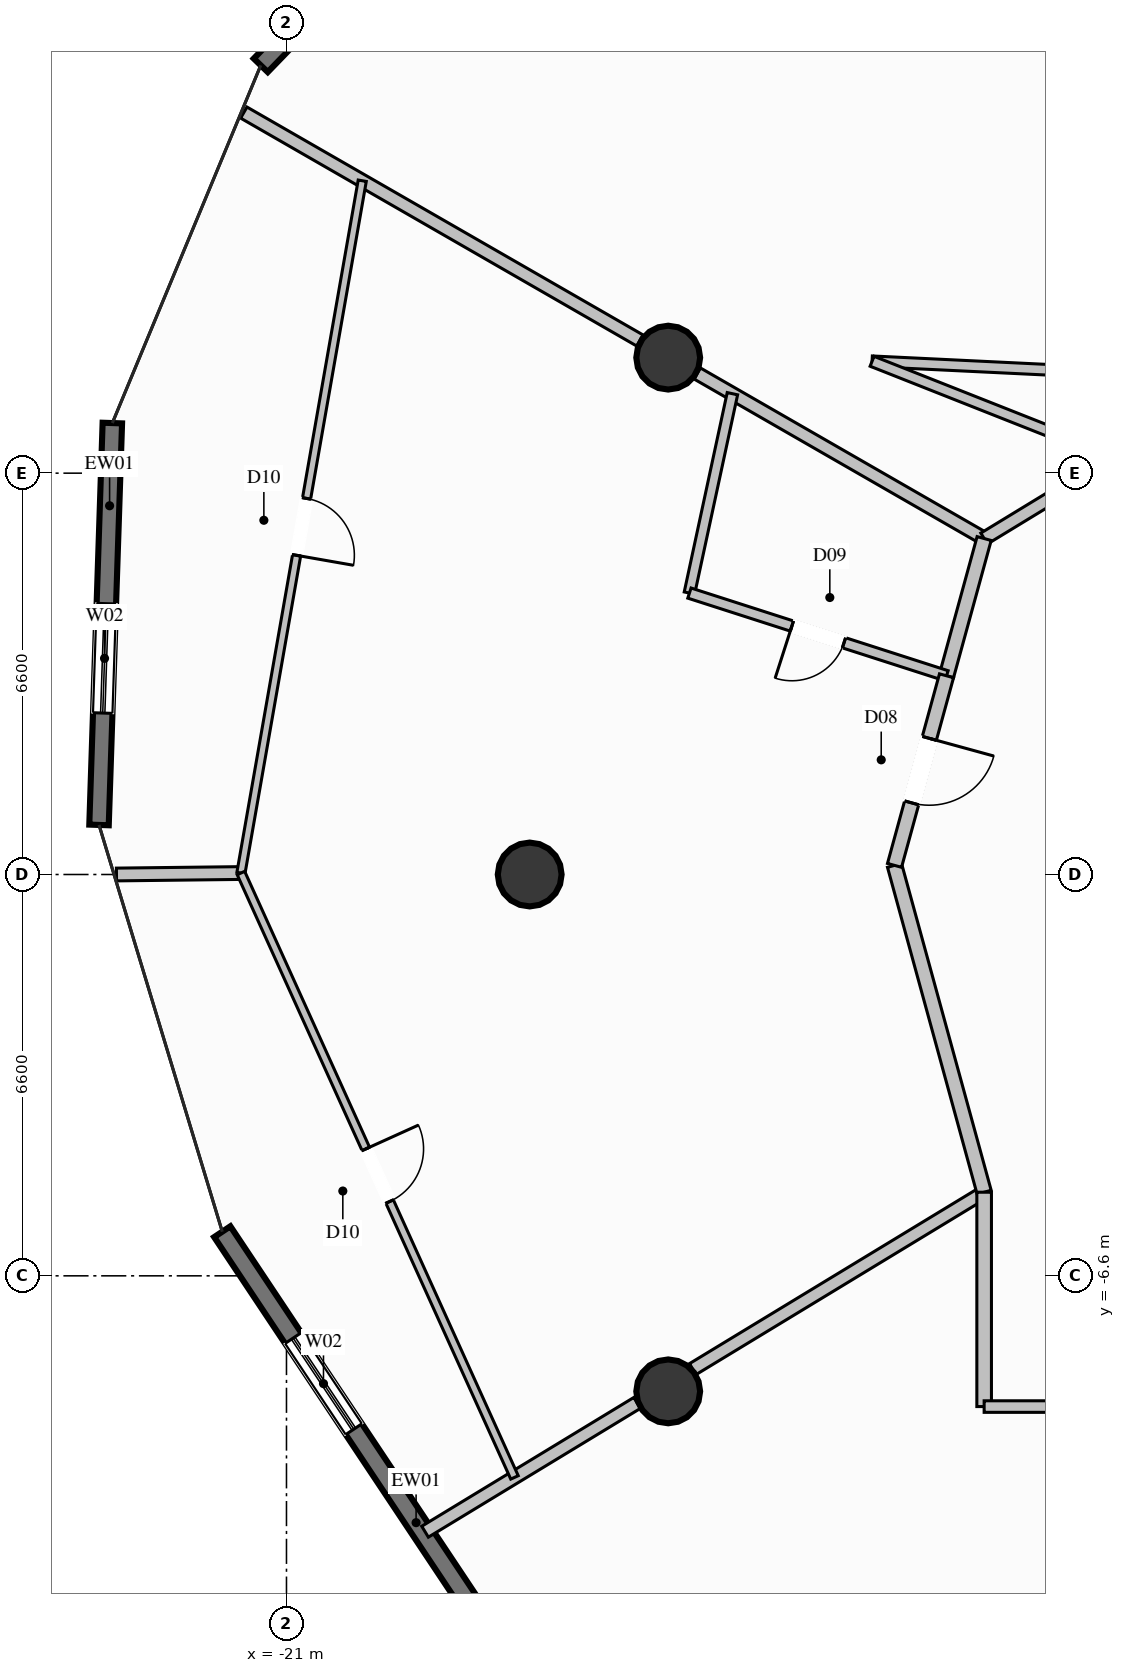
"""IFC4 building model, lengths in metres.
Left out: names, types, materials, properties, quantities, classifications, styles, units other than length and angle.
Written with IfcOpenShell. Run it as: python <this file> out.ifc"""

import sys

from ifc_helpers import new_model, si_unit, direction, frame, frame_2d, origin, origin_2d, place, context, subcontext, project, spatial, rectangle, circle, extrude, element, fill, save


model = new_model("IFC4")
c1 = context("Model", 3, precision=1e-05, world=origin(), true_north=direction((0.0, 1.0)))
c2 = subcontext(c1, "Body", "Model", "MODEL_VIEW")
j1 = project(units=[si_unit("LENGTHUNIT", "METRE"), si_unit("PLANEANGLEUNIT", "RADIAN")], contexts=[c1])
p1 = place(None, origin())
s1 = spatial("IfcSite", under=j1, at=p1, CompositionType="ELEMENT")
p2 = place(p1, origin())
s2 = spatial("IfcBuilding", under=s1, at=p2, CompositionType="ELEMENT")
p3 = place(p2, frame((0.0, 0.0, 113.4)))
s3 = spatial("IfcBuildingStorey", under=s2, at=p3, CompositionType="ELEMENT", Elevation=113.4)
for number, where, z_axis, x_axis in (
    (1, (-14.722, 8.5, 0.0), (0.0, 0.0, 1.0), (1.0, 0.0, 0.0)),
    (2, (-17.0, 0.0, 0.0), (0.0, 0.0, 1.0), (1.0, 0.0, 0.0)),
    (3, (-14.722, -8.5, 0.0), (0.0, 0.0, 1.0), (1.0, 0.0, 0.0)),
):
    element("IfcColumn", number, at=place(p3, frame(where, z_axis=z_axis, x_axis=x_axis)), inside=s3, PredefinedType="COLUMN", context=c2, shape_type="SweptSolid", body=[
        extrude(circle(Radius=0.525, at=origin_2d()), origin(), (0.0, 0.0, 1.0), 3.6),
    ])
p4 = place(p3, frame((-21.423, 13.307, 0.0), z_axis=(0.0, 0.0, 1.0), x_axis=(0.694909802273, 0.71909691051, 0.0)))
e4 = element("IfcWall", 4, at=p4, inside=s3, PredefinedType="SOLIDWALL", context=c2, shape_type="SweptSolid", body=[
    extrude(rectangle(XDim=6.369, YDim=0.32, at=frame_2d((3.185, 0.0))), origin(), (0.0, 0.0, 1.0), 3.35),
])
p5 = place(p4, frame((2.285, 0.0, 0.35)))
e5 = element("IfcOpeningElement", 5, at=p5, cuts=e4, PredefinedType="OPENING", context=c2, shape_type="SweptSolid", body=[
    extrude(rectangle(XDim=1.8, YDim=2.6, at=frame_2d((0.9, 1.3))), frame((0.0, 0.17, 0.0), z_axis=(0.0, -1.0, 0.0), x_axis=(1.0, 0.0, 0.0)), (0.0, 0.0, 1.0), 0.34),
])
p6 = place(p3, frame((-24.083, 0.815, 0.0), z_axis=(0.0, 0.0, 1.0), x_axis=(0.033116914102, 0.999451484566, 0.0)))
e6 = element("IfcWall", 6, at=p6, inside=s3, PredefinedType="SOLIDWALL", context=c2, shape_type="SweptSolid", body=[
    extrude(rectangle(XDim=6.613, YDim=0.32, at=frame_2d((3.306, 0.0))), origin(), (0.0, 0.0, 1.0), 3.35),
])
p7 = place(p6, frame((1.841, 0.0, 0.35)))
e7 = element("IfcOpeningElement", 7, at=p7, cuts=e6, PredefinedType="OPENING", context=c2, shape_type="SweptSolid", body=[
    extrude(rectangle(XDim=1.8, YDim=2.6, at=frame_2d((0.9, 1.3))), frame((0.0, 0.17, 0.0), z_axis=(0.0, -1.0, 0.0), x_axis=(1.0, 0.0, 0.0)), (0.0, 0.0, 1.0), 0.34),
])
p8 = place(p3, frame((-17.983, -11.988, 0.0), z_axis=(0.0, 0.0, 1.0), x_axis=(-0.554416410256, 0.832239415096, 0.0)))
e8 = element("IfcWall", 8, at=p8, inside=s3, PredefinedType="SOLIDWALL", context=c2, shape_type="SweptSolid", body=[
    extrude(rectangle(XDim=7.346, YDim=0.32, at=frame_2d((3.673, 0.0))), origin(), (0.0, 0.0, 1.0), 3.35),
])
p9 = place(p8, frame((3.444, 0.0, 0.35)))
e9 = element("IfcOpeningElement", 9, at=p9, cuts=e8, PredefinedType="OPENING", context=c2, shape_type="SweptSolid", body=[
    extrude(rectangle(XDim=1.8, YDim=2.6, at=frame_2d((0.9, 1.3))), frame((0.0, 0.17, 0.0), z_axis=(0.0, -1.0, 0.0), x_axis=(1.0, 0.0, 0.0)), (0.0, 0.0, 1.0), 0.34),
])
p10 = place(p3, frame((-9.526, 5.525, 0.0), z_axis=(0.0, 0.0, 1.0), x_axis=(-0.866806949329, 0.498643873516, 0.0)))
e10 = element("IfcWall", 10, at=p10, inside=s3, PredefinedType="PARTITIONING", context=c2, shape_type="SweptSolid", body=[
    extrude(rectangle(XDim=5.443, YDim=0.21, at=frame_2d((2.721, 0.0))), origin(), (0.0, 0.0, 1.0), 2.718),
])
p11 = place(p3, frame((-15.188, 8.782, 0.0), z_axis=(0.0, 0.0, 1.0), x_axis=(-0.866759918317, 0.498725619954, 0.0)))
e11 = element("IfcWall", 11, at=p11, inside=s3, PredefinedType="PARTITIONING", context=c2, shape_type="SweptSolid", body=[
    extrude(rectangle(XDim=7.515, YDim=0.21, at=frame_2d((3.758, 0.0))), origin(), (0.0, 0.0, 1.0), 3.35),
])
p12 = place(p3, frame((-9.526, -5.225, 0.0), z_axis=(0.0, 0.0, 1.0), x_axis=(-0.854837879537, -0.518895172178, 0.0)))
e12 = element("IfcWall", 12, at=p12, inside=s3, PredefinedType="PARTITIONING", context=c2, shape_type="SweptSolid", body=[
    extrude(rectangle(XDim=5.606, YDim=0.21, at=frame_2d((2.803, 0.0))), origin(), (0.0, 0.0, 1.0), 2.718),
])
p13 = place(p3, frame((-15.233, -8.69, 0.0), z_axis=(0.0, 0.0, 1.0), x_axis=(-0.854741066816, -0.519054629782, 0.0)))
e13 = element("IfcWall", 13, at=p13, inside=s3, PredefinedType="PARTITIONING", context=c2, shape_type="SweptSolid", body=[
    extrude(rectangle(XDim=4.081, YDim=0.21, at=frame_2d((2.041, 0.0))), origin(), (0.0, 0.0, 1.0), 3.35),
])
p14 = place(p3, frame((-11.369, 8.44, 0.0), z_axis=(0.0, 0.0, 1.0), x_axis=(0.998833567436, -0.048285655878, 0.0)))
e14 = element("IfcWall", 14, at=p14, inside=s3, PredefinedType="PLUMBINGWALL", context=c2, shape_type="SweptSolid", body=[
    extrude(rectangle(XDim=5.425, YDim=0.175, at=frame_2d((2.713, 0.0))), origin(), (0.0, 0.0, 1.0), 3.35),
])
p15 = place(p3, frame((-11.369, 8.44, 0.0), z_axis=(0.0, 0.0, 1.0), x_axis=(0.929880296265, -0.367862249516, 0.0)))
e15 = element("IfcWall", 15, at=p15, inside=s3, PredefinedType="PLUMBINGWALL", context=c2, shape_type="SweptSolid", body=[
    extrude(rectangle(XDim=4.322, YDim=0.175, at=frame_2d((2.161, 0.0))), origin(), (0.0, 0.0, 1.0), 2.718),
])
p16 = place(p3, frame((-9.526, 5.525, 0.0), z_axis=(0.0, 0.0, 1.0), x_axis=(0.854057882133, 0.520177982969, 0.0)))
e16 = element("IfcWall", 16, at=p16, inside=s3, PredefinedType="PARTITIONING", context=c2, shape_type="SweptSolid", body=[
    extrude(rectangle(XDim=2.548, YDim=0.21, at=frame_2d((1.274, 0.0))), origin(), (0.0, 0.0, 1.0), 3.35),
])
p17 = place(p3, frame((-9.526, 5.525, 0.0), z_axis=(0.0, 0.0, 1.0), x_axis=(-0.264564800962, -0.964367910132, 0.0)))
e17 = element("IfcWall", 17, at=p17, inside=s3, PredefinedType="PARTITIONING", context=c2, shape_type="SweptSolid", body=[
    extrude(rectangle(XDim=2.34, YDim=0.24, at=frame_2d((1.17, 0.0))), origin(), (0.0, 0.0, 1.0), 3.35),
])
p18 = place(p3, frame((-13.666, 7.907, 0.0), z_axis=(0.0, 0.0, 1.0), x_axis=(-0.210776507194, -0.977534277668, 0.0)))
e18 = element("IfcWall", 18, at=p18, inside=s3, PredefinedType="PLUMBINGWALL", context=c2, shape_type="SweptSolid", body=[
    extrude(rectangle(XDim=3.354, YDim=0.175, at=frame_2d((1.677, 0.0))), origin(), (0.0, 0.0, 1.0), 3.35),
])
p19 = place(p3, frame((-10.145, 3.268, 0.0), z_axis=(0.0, 0.0, 1.0), x_axis=(-0.95197249486, 0.306183554473, 0.0)))
e19 = element("IfcWall", 19, at=p19, inside=s3, PredefinedType="PLUMBINGWALL", context=c2, shape_type="SweptSolid", body=[
    extrude(rectangle(XDim=4.441, YDim=0.175, at=frame_2d((2.221, 0.0))), origin(), (0.0, 0.0, 1.0), 3.35),
])
p20 = place(p19, frame((1.771, 0.0, 0.0)))
e20 = element("IfcOpeningElement", 20, at=p20, cuts=e19, PredefinedType="OPENING", context=c2, shape_type="SweptSolid", body=[
    extrude(rectangle(XDim=0.9, YDim=2.1, at=frame_2d((0.45, 1.05))), frame((0.0, 0.098, 0.0), z_axis=(0.0, -1.0, 0.0), x_axis=(1.0, 0.0, 0.0)), (0.0, 0.0, 1.0), 0.195),
])
p21 = place(p3, frame((-21.749, 0.024, 0.0), z_axis=(0.0, 0.0, 1.0), x_axis=(-0.999931691442, -0.011688132844, 0.0)))
e21 = element("IfcWall", 21, at=p21, inside=s3, PredefinedType="PARTITIONING", context=c2, shape_type="SweptSolid", body=[
    extrude(rectangle(XDim=2.047, YDim=0.21, at=frame_2d((1.023, 0.0))), origin(), (0.0, 0.0, 1.0), 3.35),
])
p22 = place(p3, frame((-11.0, 0.15, 0.0), z_axis=(0.0, 0.0, 1.0), x_axis=(0.264488542062, -0.964388827765, 0.0)))
e22 = element("IfcWall", 22, at=p22, inside=s3, PredefinedType="PARTITIONING", context=c2, shape_type="SweptSolid", body=[
    extrude(rectangle(XDim=5.573, YDim=0.24, at=frame_2d((2.787, 0.0))), origin(), (0.0, 0.0, 1.0), 3.35),
])
p23 = place(p3, frame((-10.145, 3.268, 0.0), z_axis=(0.0, 0.0, 1.0), x_axis=(-0.264433345006, -0.96440396414, 0.0)))
e23 = element("IfcWall", 23, at=p23, inside=s3, PredefinedType="PARTITIONING", context=c2, shape_type="SweptSolid", body=[
    extrude(rectangle(XDim=3.233, YDim=0.24, at=frame_2d((1.617, 0.0))), origin(), (0.0, 0.0, 1.0), 3.35),
])
p24 = place(p23, frame((1.067, 0.0, 0.0)))
e24 = element("IfcOpeningElement", 24, at=p24, cuts=e23, PredefinedType="OPENING", context=c2, shape_type="SweptSolid", body=[
    extrude(rectangle(XDim=1.1, YDim=2.3, at=frame_2d((0.55, 1.15))), frame((0.0, 0.13, 0.0), z_axis=(0.0, -1.0, 0.0), x_axis=(1.0, 0.0, 0.0)), (0.0, 0.0, 1.0), 0.26),
])
p25 = place(p3, frame((-19.754, 11.409, 0.0), z_axis=(0.0, 0.0, 1.0), x_axis=(-0.172610378103, -0.984990181358, 0.0)))
e25 = element("IfcWall", 25, at=p25, inside=s3, PredefinedType="PARTITIONING", context=c2, shape_type="SweptSolid", body=[
    extrude(rectangle(XDim=11.559, YDim=0.135, at=frame_2d((5.779, 0.0))), origin(), (0.0, 0.0, 1.0), 3.35),
])
p26 = place(p25, frame((5.304, 0.0, 0.0)))
e26 = element("IfcOpeningElement", 26, at=p26, cuts=e25, PredefinedType="OPENING", context=c2, shape_type="SweptSolid", body=[
    extrude(rectangle(XDim=0.95, YDim=2.1, at=frame_2d((0.475, 1.05))), frame((0.0, 0.078, 0.0), z_axis=(0.0, -1.0, 0.0), x_axis=(1.0, 0.0, 0.0)), (0.0, 0.0, 1.0), 0.155),
])
p27 = place(p3, frame((-21.749, 0.024, 0.0), z_axis=(0.0, 0.0, 1.0), x_axis=(0.412382814091, -0.911010655614, 0.0)))
e27 = element("IfcWall", 27, at=p27, inside=s3, PredefinedType="PARTITIONING", context=c2, shape_type="SweptSolid", body=[
    extrude(rectangle(XDim=10.91, YDim=0.135, at=frame_2d((5.455, 0.0))), origin(), (0.0, 0.0, 1.0), 3.35),
])
p28 = place(p27, frame((4.98, 0.0, 0.0)))
e28 = element("IfcOpeningElement", 28, at=p28, cuts=e27, PredefinedType="OPENING", context=c2, shape_type="SweptSolid", body=[
    extrude(rectangle(XDim=0.95, YDim=2.1, at=frame_2d((0.475, 1.05))), frame((0.0, 0.078, 0.0), z_axis=(0.0, -1.0, 0.0), x_axis=(1.0, 0.0, 0.0)), (0.0, 0.0, 1.0), 0.155),
])
p29 = place(p3, frame((-9.526, -5.225, 0.0), z_axis=(0.0, 0.0, 1.0), x_axis=(0.0, -1.0, 0.0)))
e29 = element("IfcWall", 29, at=p29, inside=s3, PredefinedType="PARTITIONING", context=c2, shape_type="SweptSolid", body=[
    extrude(rectangle(XDim=3.525, YDim=0.24, at=frame_2d((1.762, 0.0))), origin(), (0.0, 0.0, 1.0), 3.35),
])
p30 = place(p3, frame((-9.526, -8.75, 0.0), z_axis=(0.0, 0.0, 1.0), x_axis=(1.0, 0.0, 0.0)))
e30 = element("IfcWall", 30, at=p30, inside=s3, PredefinedType="PARTITIONING", context=c2, shape_type="SweptSolid", body=[
    extrude(rectangle(XDim=9.526, YDim=0.19, at=frame_2d((4.763, 0.0))), origin(), (0.0, 0.0, 1.0), 3.35),
])
p31 = place(p30, frame((4.288, 0.0, 0.0)))
e31 = element("IfcOpeningElement", 31, at=p31, cuts=e30, PredefinedType="OPENING", context=c2, shape_type="SweptSolid", body=[
    extrude(rectangle(XDim=0.95, YDim=2.1, at=frame_2d((0.475, 1.05))), frame((0.0, 0.105, 0.0), z_axis=(0.0, -1.0, 0.0), x_axis=(1.0, 0.0, 0.0)), (0.0, 0.0, 1.0), 0.21),
])
p32 = place(p7, origin())
e32 = element("IfcWindow", 32, at=p32, inside=s3, PartitioningType="SINGLE_PANEL", PredefinedType="WINDOW", context=c2, shape_type="SweptSolid", body=[
    extrude(rectangle(XDim=1.8, YDim=2.6, at=frame_2d((0.9, 1.3))), frame((0.0, 0.03, 0.0), z_axis=(0.0, -1.0, 0.0), x_axis=(1.0, 0.0, 0.0)), (0.0, 0.0, 1.0), 0.06),
])
fill(e7, e32)
p33 = place(p9, origin())
e33 = element("IfcWindow", 33, at=p33, inside=s3, PartitioningType="SINGLE_PANEL", PredefinedType="WINDOW", context=c2, shape_type="SweptSolid", body=[
    extrude(rectangle(XDim=1.8, YDim=2.6, at=frame_2d((0.9, 1.3))), frame((0.0, 0.03, 0.0), z_axis=(0.0, -1.0, 0.0), x_axis=(1.0, 0.0, 0.0)), (0.0, 0.0, 1.0), 0.06),
])
fill(e9, e33)
p34 = place(p20, origin())
e34 = element("IfcDoor", 34, at=p34, inside=s3, OperationType="SINGLE_SWING_RIGHT", PredefinedType="DOOR", context=c2, shape_type="SweptSolid", body=[
    extrude(rectangle(XDim=0.9, YDim=2.1, at=frame_2d((0.45, 1.05))), frame((0.0, 0.025, 0.0), z_axis=(0.0, -1.0, 0.0), x_axis=(1.0, 0.0, 0.0)), (0.0, 0.0, 1.0), 0.05),
])
fill(e20, e34)
p35 = place(p24, origin())
e35 = element("IfcDoor", 35, at=p35, inside=s3, OperationType="SINGLE_SWING_LEFT", PredefinedType="DOOR", context=c2, shape_type="SweptSolid", body=[
    extrude(rectangle(XDim=1.1, YDim=2.3, at=frame_2d((0.55, 1.15))), frame((0.0, 0.025, 0.0), z_axis=(0.0, -1.0, 0.0), x_axis=(1.0, 0.0, 0.0)), (0.0, 0.0, 1.0), 0.05),
])
fill(e24, e35)
p36 = place(p26, origin())
e36 = element("IfcDoor", 36, at=p36, inside=s3, OperationType="SINGLE_SWING_RIGHT", PredefinedType="DOOR", context=c2, shape_type="SweptSolid", body=[
    extrude(rectangle(XDim=0.95, YDim=2.1, at=frame_2d((0.475, 1.05))), frame((0.0, 0.025, 0.0), z_axis=(0.0, -1.0, 0.0), x_axis=(1.0, 0.0, 0.0)), (0.0, 0.0, 1.0), 0.05),
])
fill(e26, e36)
p37 = place(p28, origin())
e37 = element("IfcDoor", 37, at=p37, inside=s3, OperationType="SINGLE_SWING_LEFT", PredefinedType="DOOR", context=c2, shape_type="SweptSolid", body=[
    extrude(rectangle(XDim=0.95, YDim=2.1, at=frame_2d((0.475, 1.05))), frame((0.0, 0.025, 0.0), z_axis=(0.0, -1.0, 0.0), x_axis=(1.0, 0.0, 0.0)), (0.0, 0.0, 1.0), 0.05),
])
fill(e28, e37)
save(model, sys.argv[1])
